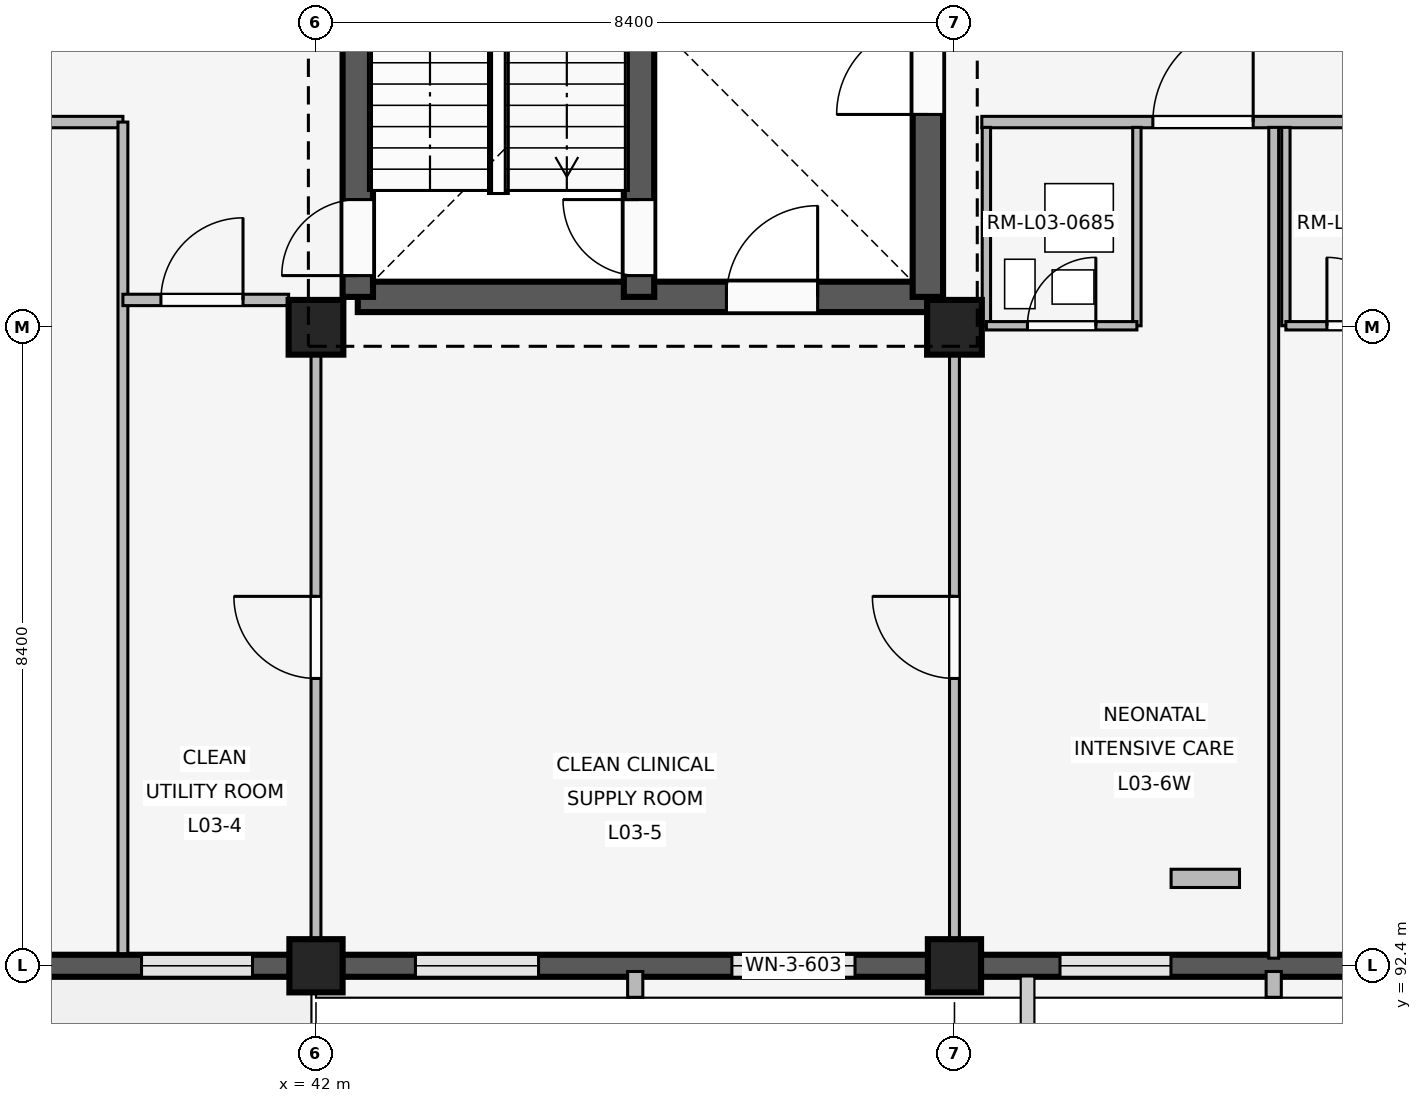
"""IFC4 building model, lengths in metres.
Left out: names, types, materials, properties, quantities, classifications, styles, units other than length and angle.
Written with IfcOpenShell. Run it as: python <this file> out.ifc"""

import sys

from ifc_helpers import new_model, si_unit, direction, frame, frame_2d, origin, origin_2d, place, context, subcontext, project, spatial, rectangle, extrude, element, fill, save


model = new_model("IFC4")
c1 = context("Model", 3, precision=1e-05, world=origin(), true_north=direction((0.0, 1.0)))
c2 = subcontext(c1, "Body", "Model", "MODEL_VIEW")
j1 = project(units=[si_unit("LENGTHUNIT", "METRE"), si_unit("PLANEANGLEUNIT", "RADIAN")], contexts=[c1])
p1 = place(None, origin())
s1 = spatial("IfcSite", under=j1, at=p1, CompositionType="ELEMENT")
p2 = place(p1, origin())
s2 = spatial("IfcBuilding", under=s1, at=p2, CompositionType="ELEMENT")
p3 = place(p2, frame((0.0, 0.0, 12.9)))
s3 = spatial("IfcBuildingStorey", under=s2, at=p3, CompositionType="ELEMENT", Elevation=12.9)
p4 = place(p3, frame((42.0, 92.4, 0.0), z_axis=(0.0, 0.0, 1.0), x_axis=(1.0, 0.0, 0.0)))
e1 = element("IfcColumn", 1, at=p4, inside=s3, PredefinedType="COLUMN", context=c2, shape_type="SweptSolid", body=[
    extrude(rectangle(XDim=0.7, YDim=0.7, at=origin_2d()), origin(), (0.0, 0.0, 1.0), 3.3),
])
p5 = place(p3, frame((42.0, 100.8, 0.0), z_axis=(0.0, 0.0, 1.0), x_axis=(1.0, 0.0, 0.0)))
e2 = element("IfcColumn", 2, at=p5, inside=s3, PredefinedType="COLUMN", context=c2, shape_type="SweptSolid", body=[
    extrude(rectangle(XDim=0.72, YDim=0.72, at=origin_2d()), origin(), (0.0, 0.0, 1.0), 3.3),
])
p6 = place(p3, frame((50.4, 92.4, 0.0), z_axis=(0.0, 0.0, 1.0), x_axis=(1.0, 0.0, 0.0)))
e3 = element("IfcColumn", 3, at=p6, inside=s3, PredefinedType="COLUMN", context=c2, shape_type="SweptSolid", body=[
    extrude(rectangle(XDim=0.7, YDim=0.7, at=origin_2d()), origin(), (0.0, 0.0, 1.0), 3.3),
])
p7 = place(p3, frame((50.4, 100.8, 0.0), z_axis=(0.0, 0.0, 1.0), x_axis=(1.0, 0.0, 0.0)))
e4 = element("IfcColumn", 4, at=p7, inside=s3, PredefinedType="COLUMN", context=c2, shape_type="SweptSolid", body=[
    extrude(rectangle(XDim=0.72, YDim=0.72, at=origin_2d()), origin(), (0.0, 0.0, 1.0), 3.3),
])
p8 = place(p3, frame((41.655, 92.4, 0.0), z_axis=(0.0, 0.0, 1.0), x_axis=(-1.0, 0.0, 0.0)))
e5 = element("IfcWall", 5, at=p8, inside=s3, PredefinedType="SOLIDWALL", context=c2, shape_type="SweptSolid", body=[
    extrude(rectangle(XDim=7.71, YDim=0.29, at=frame_2d((3.855, 0.0))), origin(), (0.0, 0.0, 1.0), 2.44),
])
p9 = place(p8, frame((0.49, 0.0, 0.85)))
e6 = element("IfcOpeningElement", 6, at=p9, cuts=e5, PredefinedType="OPENING", context=c2, shape_type="SweptSolid", body=[
    extrude(rectangle(XDim=1.46, YDim=0.85, at=frame_2d((0.73, 0.425))), frame((0.0, 0.155, 0.0), z_axis=(0.0, -1.0, 0.0), x_axis=(1.0, 0.0, 0.0)), (0.0, 0.0, 1.0), 0.31),
])
p10 = place(p8, frame((5.207, 0.0, 0.85)))
e7 = element("IfcOpeningElement", 7, at=p10, cuts=e5, PredefinedType="OPENING", context=c2, shape_type="SweptSolid", body=[
    extrude(rectangle(XDim=1.46, YDim=0.85, at=frame_2d((0.73, 0.425))), frame((0.0, 0.155, 0.0), z_axis=(0.0, -1.0, 0.0), x_axis=(1.0, 0.0, 0.0)), (0.0, 0.0, 1.0), 0.31),
])
p11 = place(p3, frame((50.055, 92.4, 0.0), z_axis=(0.0, 0.0, 1.0), x_axis=(-1.0, 0.0, 0.0)))
e8 = element("IfcWall", 8, at=p11, inside=s3, PredefinedType="SOLIDWALL", context=c2, shape_type="SweptSolid", body=[
    extrude(rectangle(XDim=7.71, YDim=0.29, at=frame_2d((3.855, 0.0))), origin(), (0.0, 0.0, 1.0), 2.44),
])
p12 = place(p11, frame((0.963, 0.0, 0.85)))
e9 = element("IfcOpeningElement", 9, at=p12, cuts=e8, PredefinedType="OPENING", context=c2, shape_type="SweptSolid", body=[
    extrude(rectangle(XDim=1.62, YDim=0.95, at=frame_2d((0.81, 0.475))), frame((0.0, 0.155, 0.0), z_axis=(0.0, -1.0, 0.0), x_axis=(1.0, 0.0, 0.0)), (0.0, 0.0, 1.0), 0.31),
])
p13 = place(p11, frame((5.127, 0.0, 0.85)))
e10 = element("IfcOpeningElement", 10, at=p13, cuts=e8, PredefinedType="OPENING", context=c2, shape_type="SweptSolid", body=[
    extrude(rectangle(XDim=1.62, YDim=0.95, at=frame_2d((0.81, 0.475))), frame((0.0, 0.155, 0.0), z_axis=(0.0, -1.0, 0.0), x_axis=(1.0, 0.0, 0.0)), (0.0, 0.0, 1.0), 0.31),
])
p14 = place(p3, frame((46.2, 92.325, 0.0), z_axis=(0.0, 0.0, 1.0), x_axis=(0.0, -1.0, 0.0)))
e11 = element("IfcWall", 11, at=p14, inside=s3, PredefinedType="ELEMENTEDWALL", context=c2, shape_type="SweptSolid", body=[
    extrude(rectangle(XDim=0.34, YDim=0.2, at=frame_2d((0.17, 0.0))), origin(), (0.0, 0.0, 1.0), 2.42),
])
p15 = place(p3, frame((58.455, 92.4, 0.0), z_axis=(0.0, 0.0, 1.0), x_axis=(-1.0, 0.0, 0.0)))
e12 = element("IfcWall", 12, at=p15, inside=s3, PredefinedType="SOLIDWALL", context=c2, shape_type="SweptSolid", body=[
    extrude(rectangle(XDim=7.71, YDim=0.29, at=frame_2d((3.855, 0.0))), origin(), (0.0, 0.0, 1.0), 2.44),
])
p16 = place(p15, frame((1.043, 0.0, 0.85)))
e13 = element("IfcOpeningElement", 13, at=p16, cuts=e12, PredefinedType="OPENING", context=c2, shape_type="SweptSolid", body=[
    extrude(rectangle(XDim=1.46, YDim=0.85, at=frame_2d((0.73, 0.425))), frame((0.0, 0.155, 0.0), z_axis=(0.0, -1.0, 0.0), x_axis=(1.0, 0.0, 0.0)), (0.0, 0.0, 1.0), 0.31),
])
p17 = place(p15, frame((5.207, 0.0, 0.85)))
e14 = element("IfcOpeningElement", 14, at=p17, cuts=e12, PredefinedType="OPENING", context=c2, shape_type="SweptSolid", body=[
    extrude(rectangle(XDim=1.46, YDim=0.85, at=frame_2d((0.73, 0.425))), frame((0.0, 0.155, 0.0), z_axis=(0.0, -1.0, 0.0), x_axis=(1.0, 0.0, 0.0)), (0.0, 0.0, 1.0), 0.31),
])
p18 = place(p3, frame((54.6, 92.325, 0.0), z_axis=(0.0, 0.0, 1.0), x_axis=(0.0, -1.0, 0.0)))
e15 = element("IfcWall", 15, at=p18, inside=s3, PredefinedType="ELEMENTEDWALL", context=c2, shape_type="SweptSolid", body=[
    extrude(rectangle(XDim=0.34, YDim=0.2, at=frame_2d((0.17, 0.0))), origin(), (0.0, 0.0, 1.0), 2.42),
])
p19 = place(p3, frame((42.55, 101.2, 0.0), z_axis=(0.0, 0.0, 1.0), x_axis=(1.0, 0.0, 0.0)))
e16 = element("IfcWall", 16, at=p19, inside=s3, PredefinedType="SHEAR", context=c2, shape_type="SweptSolid", body=[
    extrude(rectangle(XDim=7.5, YDim=0.4, at=frame_2d((3.75, 0.0))), origin(), (0.0, 0.0, 1.0), 3.02),
])
p20 = place(p19, frame((4.85, 0.0, 0.0)))
e17 = element("IfcOpeningElement", 17, at=p20, cuts=e16, PredefinedType="OPENING", context=c2, shape_type="SweptSolid", body=[
    extrude(rectangle(XDim=1.2, YDim=2.2, at=frame_2d((0.6, 1.1))), frame((0.0, 0.21, 0.0), z_axis=(0.0, -1.0, 0.0), x_axis=(1.0, 0.0, 0.0)), (0.0, 0.0, 1.0), 0.42),
])
p21 = place(p3, frame((42.55, 101.2, 0.0), z_axis=(0.0, 0.0, 1.0), x_axis=(0.0, 1.0, 0.0)))
e18 = element("IfcWall", 18, at=p21, inside=s3, PredefinedType="SHEAR", context=c2, shape_type="SweptSolid", body=[
    extrude(rectangle(XDim=7.55, YDim=0.4, at=frame_2d((3.775, 0.0))), origin(), (0.0, 0.0, 1.0), 3.02),
])
p22 = place(p21, frame((0.28, 0.0, 0.0)))
e19 = element("IfcOpeningElement", 19, at=p22, cuts=e18, PredefinedType="OPENING", context=c2, shape_type="SweptSolid", body=[
    extrude(rectangle(XDim=1.0, YDim=2.15, at=frame_2d((0.5, 1.075))), frame((0.0, 0.21, 0.0), z_axis=(0.0, -1.0, 0.0), x_axis=(1.0, 0.0, 0.0)), (0.0, 0.0, 1.0), 0.42),
])
p23 = place(p3, frame((50.05, 101.2, 0.0), z_axis=(0.0, 0.0, 1.0), x_axis=(0.0, 1.0, 0.0)))
e20 = element("IfcWall", 20, at=p23, inside=s3, PredefinedType="SHEAR", context=c2, shape_type="SweptSolid", body=[
    extrude(rectangle(XDim=7.55, YDim=0.4, at=frame_2d((3.775, 0.0))), origin(), (0.0, 0.0, 1.0), 3.02),
])
p24 = place(p23, frame((2.4, 0.0, 0.0)))
e21 = element("IfcOpeningElement", 21, at=p24, cuts=e20, PredefinedType="OPENING", context=c2, shape_type="SweptSolid", body=[
    extrude(rectangle(XDim=1.2, YDim=2.2, at=frame_2d((0.6, 1.1))), frame((0.0, 0.21, 0.0), z_axis=(0.0, -1.0, 0.0), x_axis=(1.0, 0.0, 0.0)), (0.0, 0.0, 1.0), 0.42),
])
p25 = place(p3, frame((46.25, 101.2, 0.0), z_axis=(0.0, 0.0, 1.0), x_axis=(0.0, 1.0, 0.0)))
e22 = element("IfcWall", 22, at=p25, inside=s3, PredefinedType="SHEAR", context=c2, shape_type="SweptSolid", body=[
    extrude(rectangle(XDim=7.55, YDim=0.4, at=frame_2d((3.775, 0.0))), origin(), (0.0, 0.0, 1.0), 3.02),
])
p26 = place(p25, frame((0.28, 0.0, 0.0)))
e23 = element("IfcOpeningElement", 23, at=p26, cuts=e22, PredefinedType="OPENING", context=c2, shape_type="SweptSolid", body=[
    extrude(rectangle(XDim=1.0, YDim=2.15, at=frame_2d((0.5, 1.075))), frame((0.0, 0.21, 0.0), z_axis=(0.0, -1.0, 0.0), x_axis=(1.0, 0.0, 0.0)), (0.0, 0.0, 1.0), 0.42),
])
p27 = place(p3, frame((33.68, 103.5, 0.0), z_axis=(0.0, 0.0, 1.0), x_axis=(1.0, 0.0, 0.0)))
e24 = element("IfcWall", 24, at=p27, inside=s3, PredefinedType="PARTITIONING", context=c2, shape_type="SweptSolid", body=[
    extrude(rectangle(XDim=5.78, YDim=0.15, at=frame_2d((2.89, 0.0))), origin(), (0.0, 0.0, 1.0), 2.42),
])
p28 = place(p27, frame((2.38, 0.0, 0.0)))
e25 = element("IfcOpeningElement", 25, at=p28, cuts=e24, PredefinedType="OPENING", context=c2, shape_type="SweptSolid", body=[
    extrude(rectangle(XDim=1.25, YDim=2.2, at=frame_2d((0.625, 1.1))), frame((0.0, 0.085, 0.0), z_axis=(0.0, -1.0, 0.0), x_axis=(1.0, 0.0, 0.0)), (0.0, 0.0, 1.0), 0.17),
])
p29 = place(p3, frame((39.46, 92.56, 0.0), z_axis=(0.0, 0.0, 1.0), x_axis=(0.0, 1.0, 0.0)))
e26 = element("IfcWall", 26, at=p29, inside=s3, PredefinedType="PARTITIONING", context=c2, shape_type="SweptSolid", body=[
    extrude(rectangle(XDim=10.94, YDim=0.13, at=frame_2d((5.47, 0.0))), origin(), (0.0, 0.0, 1.0), 2.42),
])
p30 = place(p3, frame((39.46, 101.16, 0.0), z_axis=(0.0, 0.0, 1.0), x_axis=(1.0, 0.0, 0.0)))
e27 = element("IfcWall", 27, at=p30, inside=s3, PredefinedType="PARTITIONING", context=c2, shape_type="SweptSolid", body=[
    extrude(rectangle(XDim=2.18, YDim=0.15, at=frame_2d((1.09, 0.0))), origin(), (0.0, 0.0, 1.0), 2.42),
])
p31 = place(p30, frame((0.5, 0.0, 0.0)))
e28 = element("IfcOpeningElement", 28, at=p31, cuts=e27, PredefinedType="OPENING", context=c2, shape_type="SweptSolid", body=[
    extrude(rectangle(XDim=1.08, YDim=2.15, at=frame_2d((0.54, 1.075))), frame((0.0, 0.085, 0.0), z_axis=(0.0, -1.0, 0.0), x_axis=(1.0, 0.0, 0.0)), (0.0, 0.0, 1.0), 0.17),
])
p32 = place(p3, frame((42.0, 92.54, 0.0), z_axis=(0.0, 0.0, 1.0), x_axis=(0.0, 1.0, 0.0)))
e29 = element("IfcWall", 29, at=p32, inside=s3, PredefinedType="PARTITIONING", context=c2, shape_type="SweptSolid", body=[
    extrude(rectangle(XDim=8.21, YDim=0.13, at=frame_2d((4.105, 0.0))), origin(), (0.0, 0.0, 1.0), 2.42),
])
p33 = place(p32, frame((3.64, 0.0, 0.0)))
e30 = element("IfcOpeningElement", 30, at=p33, cuts=e29, PredefinedType="OPENING", context=c2, shape_type="SweptSolid", body=[
    extrude(rectangle(XDim=1.08, YDim=2.15, at=frame_2d((0.54, 1.075))), frame((0.0, 0.075, 0.0), z_axis=(0.0, -1.0, 0.0), x_axis=(1.0, 0.0, 0.0)), (0.0, 0.0, 1.0), 0.15),
])
p34 = place(p3, frame((50.4, 92.54, 0.0), z_axis=(0.0, 0.0, 1.0), x_axis=(0.0, 1.0, 0.0)))
e31 = element("IfcWall", 31, at=p34, inside=s3, PredefinedType="PARTITIONING", context=c2, shape_type="SweptSolid", body=[
    extrude(rectangle(XDim=8.21, YDim=0.13, at=frame_2d((4.105, 0.0))), origin(), (0.0, 0.0, 1.0), 2.42),
])
p35 = place(p34, frame((3.64, 0.0, 0.0)))
e32 = element("IfcOpeningElement", 32, at=p35, cuts=e31, PredefinedType="OPENING", context=c2, shape_type="SweptSolid", body=[
    extrude(rectangle(XDim=1.08, YDim=2.15, at=frame_2d((0.54, 1.075))), frame((0.0, 0.075, 0.0), z_axis=(0.0, -1.0, 0.0), x_axis=(1.0, 0.0, 0.0)), (0.0, 0.0, 1.0), 0.15),
])
p36 = place(p3, frame((50.76, 103.5, 0.0), z_axis=(0.0, 0.0, 1.0), x_axis=(1.0, 0.0, 0.0)))
e33 = element("IfcWall", 33, at=p36, inside=s3, PredefinedType="PARTITIONING", context=c2, shape_type="SweptSolid", body=[
    extrude(rectangle(XDim=7.96, YDim=0.15, at=frame_2d((3.98, 0.0))), origin(), (0.0, 0.0, 1.0), 2.42),
])
p37 = place(p36, frame((2.25, 0.0, 0.0)))
e34 = element("IfcOpeningElement", 34, at=p37, cuts=e33, PredefinedType="OPENING", context=c2, shape_type="SweptSolid", body=[
    extrude(rectangle(XDim=1.32, YDim=2.25, at=frame_2d((0.66, 1.125))), frame((0.0, 0.085, 0.0), z_axis=(0.0, -1.0, 0.0), x_axis=(1.0, 0.0, 0.0)), (0.0, 0.0, 1.0), 0.17),
])
p38 = place(p36, frame((5.95, 0.0, 0.0)))
e35 = element("IfcOpeningElement", 35, at=p38, cuts=e33, PredefinedType="OPENING", context=c2, shape_type="SweptSolid", body=[
    extrude(rectangle(XDim=1.32, YDim=2.25, at=frame_2d((0.66, 1.125))), frame((0.0, 0.085, 0.0), z_axis=(0.0, -1.0, 0.0), x_axis=(1.0, 0.0, 0.0)), (0.0, 0.0, 1.0), 0.17),
])
p39 = place(p3, frame((54.6, 92.5, 0.0), z_axis=(0.0, 0.0, 1.0), x_axis=(0.0, 1.0, 0.0)))
e36 = element("IfcWall", 36, at=p39, inside=s3, PredefinedType="PARTITIONING", context=c2, shape_type="SweptSolid", body=[
    extrude(rectangle(XDim=10.93, YDim=0.13, at=frame_2d((5.465, 0.0))), origin(), (0.0, 0.0, 1.0), 2.42),
])
for number, where, z_axis, x_axis in (
    (37, (50.82, 100.82, 0.0), (0.0, 0.0, 1.0), (0.0, 1.0, 0.0)),
    (38, (52.8, 100.82, 0.0), (0.0, 0.0, 1.0), (0.0, 1.0, 0.0)),
):
    element("IfcWall", number, at=place(p3, frame(where, z_axis=z_axis, x_axis=x_axis)), inside=s3, PredefinedType="PARTITIONING", context=c2, shape_type="SweptSolid", body=[
        extrude(rectangle(XDim=2.61, YDim=0.11, at=frame_2d((1.305, 0.0))), origin(), (0.0, 0.0, 1.0), 2.42),
    ])
p40 = place(p3, frame((50.82, 100.82, 0.0), z_axis=(0.0, 0.0, 1.0), x_axis=(1.0, 0.0, 0.0)))
e39 = element("IfcWall", 39, at=p40, inside=s3, PredefinedType="PARTITIONING", context=c2, shape_type="SweptSolid", body=[
    extrude(rectangle(XDim=1.98, YDim=0.11, at=frame_2d((0.99, 0.0))), origin(), (0.0, 0.0, 1.0), 2.42),
])
p41 = place(p40, frame((0.54, 0.0, 0.0)))
e40 = element("IfcOpeningElement", 40, at=p41, cuts=e39, PredefinedType="OPENING", context=c2, shape_type="SweptSolid", body=[
    extrude(rectangle(XDim=0.9, YDim=2.1, at=frame_2d((0.45, 1.05))), frame((0.0, 0.065, 0.0), z_axis=(0.0, -1.0, 0.0), x_axis=(1.0, 0.0, 0.0)), (0.0, 0.0, 1.0), 0.13),
])
p42 = place(p3, frame((54.76, 100.82, 0.0), z_axis=(0.0, 0.0, 1.0), x_axis=(0.0, 1.0, 0.0)))
e41 = element("IfcWall", 41, at=p42, inside=s3, PredefinedType="PARTITIONING", context=c2, shape_type="SweptSolid", body=[
    extrude(rectangle(XDim=2.61, YDim=0.11, at=frame_2d((1.305, 0.0))), origin(), (0.0, 0.0, 1.0), 2.42),
])
p43 = place(p3, frame((54.76, 100.82, 0.0), z_axis=(0.0, 0.0, 1.0), x_axis=(1.0, 0.0, 0.0)))
e42 = element("IfcWall", 42, at=p43, inside=s3, PredefinedType="PARTITIONING", context=c2, shape_type="SweptSolid", body=[
    extrude(rectangle(XDim=1.98, YDim=0.11, at=frame_2d((0.99, 0.0))), origin(), (0.0, 0.0, 1.0), 2.42),
])
p44 = place(p43, frame((0.54, 0.0, 0.0)))
e43 = element("IfcOpeningElement", 43, at=p44, cuts=e42, PredefinedType="OPENING", context=c2, shape_type="SweptSolid", body=[
    extrude(rectangle(XDim=0.9, YDim=2.1, at=frame_2d((0.45, 1.05))), frame((0.0, 0.065, 0.0), z_axis=(0.0, -1.0, 0.0), x_axis=(1.0, 0.0, 0.0)), (0.0, 0.0, 1.0), 0.13),
])
p45 = place(p3, frame((53.25, 93.55, 0.0), z_axis=(0.0, 0.0, 1.0), x_axis=(1.0, 0.0, 0.0)))
e44 = element("IfcWall", 44, at=p45, inside=s3, PredefinedType="PLUMBINGWALL", context=c2, shape_type="SweptSolid", body=[
    extrude(rectangle(XDim=0.9, YDim=0.24, at=frame_2d((0.45, 0.0))), origin(), (0.0, 0.0, 1.0), 2.42),
])
p46 = place(p9, origin())
e45 = element("IfcWindow", 45, at=p46, inside=s3, PartitioningType="SINGLE_PANEL", PredefinedType="WINDOW", context=c2, shape_type="SweptSolid", body=[
    extrude(rectangle(XDim=1.46, YDim=0.85, at=frame_2d((0.73, 0.425))), frame((0.0, 0.03, 0.0), z_axis=(0.0, -1.0, 0.0), x_axis=(1.0, 0.0, 0.0)), (0.0, 0.0, 1.0), 0.06),
])
fill(e6, e45)
p47 = place(p12, origin())
e46 = element("IfcWindow", 46, at=p47, inside=s3, PartitioningType="SINGLE_PANEL", PredefinedType="WINDOW", context=c2, shape_type="SweptSolid", body=[
    extrude(rectangle(XDim=1.62, YDim=0.95, at=frame_2d((0.81, 0.475))), frame((0.0, 0.03, 0.0), z_axis=(0.0, -1.0, 0.0), x_axis=(1.0, 0.0, 0.0)), (0.0, 0.0, 1.0), 0.06),
])
fill(e9, e46)
p48 = place(p13, origin())
e47 = element("IfcWindow", 47, at=p48, inside=s3, PartitioningType="SINGLE_PANEL", PredefinedType="WINDOW", context=c2, shape_type="SweptSolid", body=[
    extrude(rectangle(XDim=1.62, YDim=0.95, at=frame_2d((0.81, 0.475))), frame((0.0, 0.03, 0.0), z_axis=(0.0, -1.0, 0.0), x_axis=(1.0, 0.0, 0.0)), (0.0, 0.0, 1.0), 0.06),
])
fill(e10, e47)
p49 = place(p17, origin())
e48 = element("IfcWindow", 48, at=p49, inside=s3, PartitioningType="SINGLE_PANEL", PredefinedType="WINDOW", context=c2, shape_type="SweptSolid", body=[
    extrude(rectangle(XDim=1.46, YDim=0.85, at=frame_2d((0.73, 0.425))), frame((0.0, 0.03, 0.0), z_axis=(0.0, -1.0, 0.0), x_axis=(1.0, 0.0, 0.0)), (0.0, 0.0, 1.0), 0.06),
])
fill(e14, e48)
p50 = place(p24, origin())
e49 = element("IfcDoor", 49, at=p50, inside=s3, OperationType="SINGLE_SWING_LEFT", PredefinedType="DOOR", context=c2, shape_type="SweptSolid", body=[
    extrude(rectangle(XDim=1.2, YDim=2.2, at=frame_2d((0.6, 1.1))), frame((0.0, 0.025, 0.0), z_axis=(0.0, -1.0, 0.0), x_axis=(1.0, 0.0, 0.0)), (0.0, 0.0, 1.0), 0.05),
])
fill(e21, e49)
p51 = place(p20, origin())
e50 = element("IfcDoor", 50, at=p51, inside=s3, OperationType="SINGLE_SWING_RIGHT", PredefinedType="DOOR", context=c2, shape_type="SweptSolid", body=[
    extrude(rectangle(XDim=1.2, YDim=2.2, at=frame_2d((0.6, 1.1))), frame((0.0, 0.025, 0.0), z_axis=(0.0, -1.0, 0.0), x_axis=(1.0, 0.0, 0.0)), (0.0, 0.0, 1.0), 0.05),
])
fill(e17, e50)
p52 = place(p22, origin())
e51 = element("IfcDoor", 51, at=p52, inside=s3, OperationType="SINGLE_SWING_LEFT", PredefinedType="DOOR", context=c2, shape_type="SweptSolid", body=[
    extrude(rectangle(XDim=1.0, YDim=2.15, at=frame_2d((0.5, 1.075))), frame((0.0, 0.025, 0.0), z_axis=(0.0, -1.0, 0.0), x_axis=(1.0, 0.0, 0.0)), (0.0, 0.0, 1.0), 0.05),
])
fill(e19, e51)
p53 = place(p26, origin())
e52 = element("IfcDoor", 52, at=p53, inside=s3, OperationType="SINGLE_SWING_RIGHT", PredefinedType="DOOR", context=c2, shape_type="SweptSolid", body=[
    extrude(rectangle(XDim=1.0, YDim=2.15, at=frame_2d((0.5, 1.075))), frame((0.0, 0.025, 0.0), z_axis=(0.0, -1.0, 0.0), x_axis=(1.0, 0.0, 0.0)), (0.0, 0.0, 1.0), 0.05),
])
fill(e23, e52)
p54 = place(p31, origin())
e53 = element("IfcDoor", 53, at=p54, inside=s3, OperationType="SINGLE_SWING_RIGHT", PredefinedType="DOOR", context=c2, shape_type="SweptSolid", body=[
    extrude(rectangle(XDim=1.08, YDim=2.15, at=frame_2d((0.54, 1.075))), frame((0.0, 0.025, 0.0), z_axis=(0.0, -1.0, 0.0), x_axis=(1.0, 0.0, 0.0)), (0.0, 0.0, 1.0), 0.05),
])
fill(e28, e53)
p55 = place(p33, origin())
e54 = element("IfcDoor", 54, at=p55, inside=s3, OperationType="SINGLE_SWING_RIGHT", PredefinedType="DOOR", context=c2, shape_type="SweptSolid", body=[
    extrude(rectangle(XDim=1.08, YDim=2.15, at=frame_2d((0.54, 1.075))), frame((0.0, 0.025, 0.0), z_axis=(0.0, -1.0, 0.0), x_axis=(1.0, 0.0, 0.0)), (0.0, 0.0, 1.0), 0.05),
])
fill(e30, e54)
p56 = place(p35, origin())
e55 = element("IfcDoor", 55, at=p56, inside=s3, OperationType="SINGLE_SWING_RIGHT", PredefinedType="DOOR", context=c2, shape_type="SweptSolid", body=[
    extrude(rectangle(XDim=1.08, YDim=2.15, at=frame_2d((0.54, 1.075))), frame((0.0, 0.025, 0.0), z_axis=(0.0, -1.0, 0.0), x_axis=(1.0, 0.0, 0.0)), (0.0, 0.0, 1.0), 0.05),
])
fill(e32, e55)
p57 = place(p37, origin())
e56 = element("IfcDoor", 56, at=p57, inside=s3, OperationType="SINGLE_SWING_RIGHT", PredefinedType="DOOR", context=c2, shape_type="SweptSolid", body=[
    extrude(rectangle(XDim=1.32, YDim=2.25, at=frame_2d((0.66, 1.125))), frame((0.0, 0.025, 0.0), z_axis=(0.0, -1.0, 0.0), x_axis=(1.0, 0.0, 0.0)), (0.0, 0.0, 1.0), 0.05),
])
fill(e34, e56)
p58 = place(p41, origin())
e57 = element("IfcDoor", 57, at=p58, inside=s3, OperationType="SINGLE_SWING_RIGHT", PredefinedType="DOOR", context=c2, shape_type="SweptSolid", body=[
    extrude(rectangle(XDim=0.9, YDim=2.1, at=frame_2d((0.45, 1.05))), frame((0.0, 0.025, 0.0), z_axis=(0.0, -1.0, 0.0), x_axis=(1.0, 0.0, 0.0)), (0.0, 0.0, 1.0), 0.05),
])
fill(e40, e57)
p59 = place(p44, origin())
e58 = element("IfcDoor", 58, at=p59, inside=s3, OperationType="SINGLE_SWING_LEFT", PredefinedType="DOOR", context=c2, shape_type="SweptSolid", body=[
    extrude(rectangle(XDim=0.9, YDim=2.1, at=frame_2d((0.45, 1.05))), frame((0.0, 0.025, 0.0), z_axis=(0.0, -1.0, 0.0), x_axis=(1.0, 0.0, 0.0)), (0.0, 0.0, 1.0), 0.05),
])
fill(e43, e58)
save(model, sys.argv[1])
